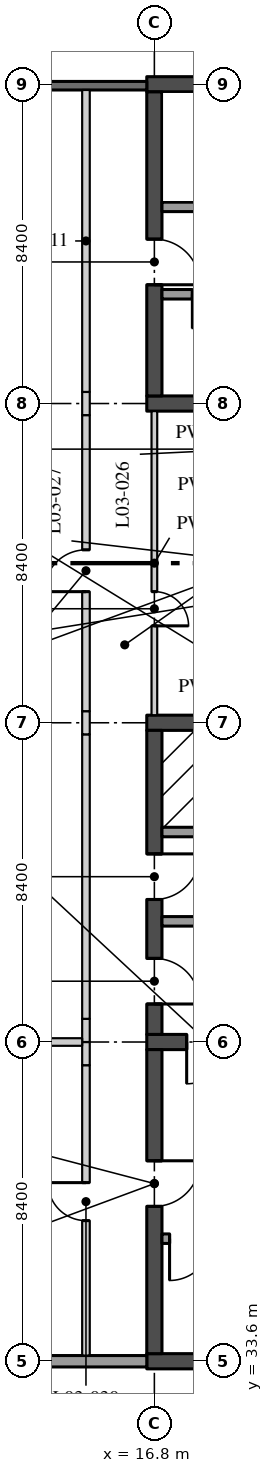
"""IFC4 building model, lengths in metres.
Left out: names, types, materials, properties, quantities, classifications, styles, units other than length and angle.
Written with IfcOpenShell. Run it as: python <this file> out.ifc"""

import sys

from ifc_helpers import new_model, si_unit, direction, frame, frame_2d, origin, place, context, subcontext, project, spatial, rectangle, extrude, element, fill, save


model = new_model("IFC4")
c1 = context("Model", 3, precision=1e-05, world=origin(), true_north=direction((0.0, 1.0)))
c2 = subcontext(c1, "Body", "Model", "MODEL_VIEW")
j1 = project(units=[si_unit("LENGTHUNIT", "METRE"), si_unit("PLANEANGLEUNIT", "RADIAN")], contexts=[c1])
p1 = place(None, origin())
s1 = spatial("IfcSite", under=j1, at=p1, CompositionType="ELEMENT")
p2 = place(p1, origin())
s2 = spatial("IfcBuilding", under=s1, at=p2, CompositionType="ELEMENT")
p3 = place(p2, frame((0.0, 0.0, 14.4)))
s3 = spatial("IfcBuildingStorey", under=s2, at=p3, CompositionType="ELEMENT", Elevation=14.4)
p4 = place(p3, frame((16.6, 42.0, 0.0), z_axis=(0.0, 0.0, 1.0), x_axis=(1.0, 0.0, 0.0)))
e1 = element("IfcWall", 1, at=p4, inside=s3, PredefinedType="SHEAR", context=c2, shape_type="SweptSolid", body=[
    extrude(rectangle(XDim=8.8, YDim=0.4, at=frame_2d((4.4, 0.0))), origin(), (0.0, 0.0, 1.0), 4.37),
])
p5 = place(p4, frame((1.05, 0.0, 0.0)))
e2 = element("IfcOpeningElement", 2, at=p5, cuts=e1, PredefinedType="OPENING", context=c2, shape_type="SweptSolid", body=[
    extrude(rectangle(XDim=1.1, YDim=2.1, at=frame_2d((0.55, 1.05))), frame((0.0, 0.21, 0.0), z_axis=(0.0, -1.0, 0.0), x_axis=(1.0, 0.0, 0.0)), (0.0, 0.0, 1.0), 0.42),
])
p6 = place(p3, frame((16.6, 50.4, 0.0), z_axis=(0.0, 0.0, 1.0), x_axis=(1.0, 0.0, 0.0)))
e3 = element("IfcWall", 3, at=p6, inside=s3, PredefinedType="SHEAR", context=c2, shape_type="SweptSolid", body=[
    extrude(rectangle(XDim=8.8, YDim=0.4, at=frame_2d((4.4, 0.0))), origin(), (0.0, 0.0, 1.0), 4.37),
])
p7 = place(p3, frame((16.8, 42.2, 0.0), z_axis=(0.0, 0.0, 1.0), x_axis=(0.0, 1.0, 0.0)))
e4 = element("IfcWall", 4, at=p7, inside=s3, PredefinedType="SHEAR", context=c2, shape_type="SweptSolid", body=[
    extrude(rectangle(XDim=8.0, YDim=0.4, at=frame_2d((4.0, 0.0))), origin(), (0.0, 0.0, 1.0), 4.37),
])
p8 = place(p7, frame((3.55, 0.0, 0.0)))
e5 = element("IfcOpeningElement", 5, at=p8, cuts=e4, PredefinedType="OPENING", context=c2, shape_type="SweptSolid", body=[
    extrude(rectangle(XDim=1.2, YDim=2.1, at=frame_2d((0.6, 1.05))), frame((0.0, 0.21, 0.0), z_axis=(0.0, -1.0, 0.0), x_axis=(1.0, 0.0, 0.0)), (0.0, 0.0, 1.0), 0.42),
])
p9 = place(p7, frame((0.8, 0.0, 0.0)))
e6 = element("IfcOpeningElement", 6, at=p9, cuts=e4, PredefinedType="OPENING", context=c2, shape_type="SweptSolid", body=[
    extrude(rectangle(XDim=1.2, YDim=2.1, at=frame_2d((0.6, 1.05))), frame((0.0, 0.21, 0.0), z_axis=(0.0, -1.0, 0.0), x_axis=(1.0, 0.0, 0.0)), (0.0, 0.0, 1.0), 0.42),
])
p10 = place(p3, frame((21.7, 47.525, 0.0), z_axis=(0.0, 0.0, 1.0), x_axis=(-1.0, 0.0, 0.0)))
e7 = element("IfcWall", 7, at=p10, inside=s3, PredefinedType="SOLIDWALL", context=c2, shape_type="SweptSolid", body=[
    extrude(rectangle(XDim=4.7, YDim=0.25, at=frame_2d((2.35, 0.0))), origin(), (0.0, 0.0, 1.0), 4.37),
])
p11 = place(p10, frame((1.9, 0.0, 0.0)))
e8 = element("IfcOpeningElement", 8, at=p11, cuts=e7, PredefinedType="OPENING", context=c2, shape_type="SweptSolid", body=[
    extrude(rectangle(XDim=0.9, YDim=2.1, at=frame_2d((0.45, 1.05))), frame((0.0, 0.135, 0.0), z_axis=(0.0, -1.0, 0.0), x_axis=(1.0, 0.0, 0.0)), (0.0, 0.0, 1.0), 0.27),
])
p12 = place(p3, frame((19.65, 45.175, 0.0), z_axis=(0.0, 0.0, 1.0), x_axis=(-1.0, 0.0, 0.0)))
e9 = element("IfcWall", 9, at=p12, inside=s3, PredefinedType="SOLIDWALL", context=c2, shape_type="SweptSolid", body=[
    extrude(rectangle(XDim=2.65, YDim=0.25, at=frame_2d((1.325, 0.0))), origin(), (0.0, 0.0, 1.0), 4.37),
])
for number, where, z_axis, x_axis in (
    (10, (16.6, 58.8, 0.0), (0.0, 0.0, 1.0), (1.0, 0.0, 0.0)),
    (11, (16.6, 67.2, 0.0), (0.0, 0.0, 1.0), (1.0, 0.0, 0.0)),
):
    element("IfcWall", number, at=place(p3, frame(where, z_axis=z_axis, x_axis=x_axis)), inside=s3, PredefinedType="SHEAR", context=c2, shape_type="SweptSolid", body=[
        extrude(rectangle(XDim=8.8, YDim=0.4, at=frame_2d((4.4, 0.0))), origin(), (0.0, 0.0, 1.0), 4.37),
    ])
p13 = place(p3, frame((16.8, 59.0, 0.0), z_axis=(0.0, 0.0, 1.0), x_axis=(0.0, 1.0, 0.0)))
e12 = element("IfcWall", 12, at=p13, inside=s3, PredefinedType="SHEAR", context=c2, shape_type="SweptSolid", body=[
    extrude(rectangle(XDim=8.0, YDim=0.4, at=frame_2d((4.0, 0.0))), origin(), (0.0, 0.0, 1.0), 4.37),
])
p14 = place(p13, frame((2.925, 0.0, 0.0)))
e13 = element("IfcOpeningElement", 13, at=p14, cuts=e12, PredefinedType="OPENING", context=c2, shape_type="SweptSolid", body=[
    extrude(rectangle(XDim=1.2, YDim=2.1, at=frame_2d((0.6, 1.05))), frame((0.0, 0.21, 0.0), z_axis=(0.0, -1.0, 0.0), x_axis=(1.0, 0.0, 0.0)), (0.0, 0.0, 1.0), 0.42),
])
p15 = place(p3, frame((25.0, 63.975, 0.0), z_axis=(0.0, 0.0, 1.0), x_axis=(-1.0, 0.0, 0.0)))
e14 = element("IfcWall", 14, at=p15, inside=s3, PredefinedType="SOLIDWALL", context=c2, shape_type="SweptSolid", body=[
    extrude(rectangle(XDim=8.0, YDim=0.25, at=frame_2d((4.0, 0.0))), origin(), (0.0, 0.0, 1.0), 4.37),
])
p16 = place(p15, frame((0.2, 0.0, 0.0)))
e15 = element("IfcOpeningElement", 15, at=p16, cuts=e14, PredefinedType="OPENING", context=c2, shape_type="SweptSolid", body=[
    extrude(rectangle(XDim=1.1, YDim=2.1, at=frame_2d((0.55, 1.05))), frame((0.0, 0.135, 0.0), z_axis=(0.0, -1.0, 0.0), x_axis=(1.0, 0.0, 0.0)), (0.0, 0.0, 1.0), 0.27),
])
p17 = place(p3, frame((22.35, 61.675, 0.0), z_axis=(0.0, 0.0, 1.0), x_axis=(-1.0, 0.0, 0.0)))
e16 = element("IfcWall", 16, at=p17, inside=s3, PredefinedType="SOLIDWALL", context=c2, shape_type="SweptSolid", body=[
    extrude(rectangle(XDim=5.35, YDim=0.25, at=frame_2d((2.675, 0.0))), origin(), (0.0, 0.0, 1.0), 4.37),
])
p18 = place(p17, frame((3.65, 0.0, 0.0)))
e17 = element("IfcOpeningElement", 17, at=p18, cuts=e16, PredefinedType="OPENING", context=c2, shape_type="SweptSolid", body=[
    extrude(rectangle(XDim=0.9, YDim=2.1, at=frame_2d((0.45, 1.05))), frame((0.0, 0.135, 0.0), z_axis=(0.0, -1.0, 0.0), x_axis=(1.0, 0.0, 0.0)), (0.0, 0.0, 1.0), 0.27),
])
p19 = place(p17, frame((0.9, 0.0, 0.0)))
e18 = element("IfcOpeningElement", 18, at=p19, cuts=e16, PredefinedType="OPENING", context=c2, shape_type="SweptSolid", body=[
    extrude(rectangle(XDim=0.8, YDim=2.1, at=frame_2d((0.4, 1.05))), frame((0.0, 0.135, 0.0), z_axis=(0.0, -1.0, 0.0), x_axis=(1.0, 0.0, 0.0)), (0.0, 0.0, 1.0), 0.27),
])
p20 = place(p3, frame((16.6, 33.6, 0.0), z_axis=(0.0, 0.0, 1.0), x_axis=(1.0, 0.0, 0.0)))
e19 = element("IfcWall", 19, at=p20, inside=s3, PredefinedType="SHEAR", context=c2, shape_type="SweptSolid", body=[
    extrude(rectangle(XDim=8.8, YDim=0.4, at=frame_2d((4.4, 0.0))), origin(), (0.0, 0.0, 1.0), 4.37),
])
p21 = place(p3, frame((16.8, 33.8, 0.0), z_axis=(0.0, 0.0, 1.0), x_axis=(0.0, 1.0, 0.0)))
e20 = element("IfcWall", 20, at=p21, inside=s3, PredefinedType="SHEAR", context=c2, shape_type="SweptSolid", body=[
    extrude(rectangle(XDim=8.0, YDim=0.4, at=frame_2d((4.0, 0.0))), origin(), (0.0, 0.0, 1.0), 4.37),
])
p22 = place(p21, frame((3.875, 0.0, 0.0)))
e21 = element("IfcOpeningElement", 21, at=p22, cuts=e20, PredefinedType="OPENING", context=c2, shape_type="SweptSolid", body=[
    extrude(rectangle(XDim=1.2, YDim=2.1, at=frame_2d((0.6, 1.05))), frame((0.0, 0.21, 0.0), z_axis=(0.0, -1.0, 0.0), x_axis=(1.0, 0.0, 0.0)), (0.0, 0.0, 1.0), 0.42),
])
p23 = place(p3, frame((17.0, 36.825, 0.0), z_axis=(0.0, 0.0, 1.0), x_axis=(1.0, 0.0, 0.0)))
e22 = element("IfcWall", 22, at=p23, inside=s3, PredefinedType="SOLIDWALL", context=c2, shape_type="SweptSolid", body=[
    extrude(rectangle(XDim=8.0, YDim=0.25, at=frame_2d((4.0, 0.0))), origin(), (0.0, 0.0, 1.0), 4.37),
])
p24 = place(p23, frame((0.2, 0.0, 0.0)))
e23 = element("IfcOpeningElement", 23, at=p24, cuts=e22, PredefinedType="OPENING", context=c2, shape_type="SweptSolid", body=[
    extrude(rectangle(XDim=1.1, YDim=2.1, at=frame_2d((0.55, 1.05))), frame((0.0, 0.135, 0.0), z_axis=(0.0, -1.0, 0.0), x_axis=(1.0, 0.0, 0.0)), (0.0, 0.0, 1.0), 0.27),
])
p25 = place(p3, frame((16.8, 50.6, 0.0), z_axis=(0.0, 0.0, 1.0), x_axis=(0.0, 1.0, 0.0)))
e24 = element("IfcWall", 24, at=p25, inside=s3, PredefinedType="PARTITIONING", context=c2, shape_type="SweptSolid", body=[
    extrude(rectangle(XDim=8.0, YDim=0.15, at=frame_2d((4.0, 0.0))), origin(), (0.0, 0.0, 1.0), 3.746),
])
p26 = place(p25, frame((2.35, 0.0, 0.0)))
e25 = element("IfcOpeningElement", 25, at=p26, cuts=e24, PredefinedType="OPENING", context=c2, shape_type="SweptSolid", body=[
    extrude(rectangle(XDim=0.9, YDim=2.1, at=frame_2d((0.45, 1.05))), frame((0.0, 0.085, 0.0), z_axis=(0.0, -1.0, 0.0), x_axis=(1.0, 0.0, 0.0)), (0.0, 0.0, 1.0), 0.17),
])
p27 = place(p3, frame((15.0, 33.75, 0.0), z_axis=(0.0, 0.0, 1.0), x_axis=(0.0, 1.0, 0.0)))
e26 = element("IfcWall", 26, at=p27, inside=s3, PredefinedType="PARTITIONING", context=c2, shape_type="SweptSolid", body=[
    extrude(rectangle(XDim=7.64, YDim=0.2, at=frame_2d((3.82, 0.0))), origin(), (0.0, 0.0, 1.0), 4.37),
])
p28 = place(p27, frame((3.55, 0.0, 0.0)))
e27 = element("IfcOpeningElement", 27, at=p28, cuts=e26, PredefinedType="OPENING", context=c2, shape_type="SweptSolid", body=[
    extrude(rectangle(XDim=1.0, YDim=2.1, at=frame_2d((0.5, 1.05))), frame((0.0, 0.11, 0.0), z_axis=(0.0, -1.0, 0.0), x_axis=(1.0, 0.0, 0.0)), (0.0, 0.0, 1.0), 0.22),
])
for number, where, z_axis, x_axis in (
    (28, (15.0, 41.39, 0.0), (0.0, 0.0, 1.0), (0.0, 1.0, 0.0)),
    (29, (15.0, 42.0, 0.0), (0.0, 0.0, 1.0), (0.0, 1.0, 0.0)),
):
    element("IfcWall", number, at=place(p3, frame(where, z_axis=z_axis, x_axis=x_axis)), inside=s3, PredefinedType="PARTITIONING", context=c2, shape_type="SweptSolid", body=[
        extrude(rectangle(XDim=0.61, YDim=0.2, at=frame_2d((0.305, 0.0))), origin(), (0.0, 0.0, 1.0), 3.746),
    ])
p29 = place(p3, frame((15.0, 42.61, 0.0), z_axis=(0.0, 0.0, 1.0), x_axis=(0.0, 1.0, 0.0)))
e30 = element("IfcWall", 30, at=p29, inside=s3, PredefinedType="PARTITIONING", context=c2, shape_type="SweptSolid", body=[
    extrude(rectangle(XDim=7.485, YDim=0.2, at=frame_2d((3.742, 0.0))), origin(), (0.0, 0.0, 1.0), 4.37),
])
p30 = place(p3, frame((15.0, 50.095, 0.0), z_axis=(0.0, 0.0, 1.0), x_axis=(0.0, 1.0, 0.0)))
e31 = element("IfcWall", 31, at=p30, inside=s3, PredefinedType="PARTITIONING", context=c2, shape_type="SweptSolid", body=[
    extrude(rectangle(XDim=0.61, YDim=0.2, at=frame_2d((0.305, 0.0))), origin(), (0.0, 0.0, 1.0), 3.746),
])
p31 = place(p3, frame((15.0, 50.705, 0.0), z_axis=(0.0, 0.0, 1.0), x_axis=(0.0, 1.0, 0.0)))
e32 = element("IfcWall", 32, at=p31, inside=s3, PredefinedType="PARTITIONING", context=c2, shape_type="SweptSolid", body=[
    extrude(rectangle(XDim=7.79, YDim=0.2, at=frame_2d((3.895, 0.0))), origin(), (0.0, 0.0, 1.0), 4.37),
])
p32 = place(p31, frame((3.145, 0.0, 0.0)))
e33 = element("IfcOpeningElement", 33, at=p32, cuts=e32, PredefinedType="OPENING", context=c2, shape_type="SweptSolid", body=[
    extrude(rectangle(XDim=1.1, YDim=2.1, at=frame_2d((0.55, 1.05))), frame((0.0, 0.11, 0.0), z_axis=(0.0, -1.0, 0.0), x_axis=(1.0, 0.0, 0.0)), (0.0, 0.0, 1.0), 0.22),
])
p33 = place(p3, frame((15.0, 58.495, 0.0), z_axis=(0.0, 0.0, 1.0), x_axis=(0.0, 1.0, 0.0)))
e34 = element("IfcWall", 34, at=p33, inside=s3, PredefinedType="PARTITIONING", context=c2, shape_type="SweptSolid", body=[
    extrude(rectangle(XDim=0.61, YDim=0.2, at=frame_2d((0.305, 0.0))), origin(), (0.0, 0.0, 1.0), 3.746),
])
p34 = place(p3, frame((15.0, 59.105, 0.0), z_axis=(0.0, 0.0, 1.0), x_axis=(0.0, 1.0, 0.0)))
e35 = element("IfcWall", 35, at=p34, inside=s3, PredefinedType="PARTITIONING", context=c2, shape_type="SweptSolid", body=[
    extrude(rectangle(XDim=7.945, YDim=0.2, at=frame_2d((3.973, 0.0))), origin(), (0.0, 0.0, 1.0), 4.37),
])
p35 = place(p3, frame((8.585, 42.0, 0.0), z_axis=(0.0, 0.0, 1.0), x_axis=(1.0, 0.0, 0.0)))
e36 = element("IfcWall", 36, at=p35, inside=s3, PredefinedType="PARTITIONING", context=c2, shape_type="SweptSolid", body=[
    extrude(rectangle(XDim=6.315, YDim=0.2, at=frame_2d((3.157, 0.0))), origin(), (0.0, 0.0, 1.0), 3.746),
])
p36 = place(p3, frame((16.6, 67.163, 0.0), z_axis=(0.0, 0.0, 1.0), x_axis=(-1.0, 0.0, 0.0)))
e37 = element("IfcWall", 37, at=p36, inside=s3, PredefinedType="SOLIDWALL", context=c2, shape_type="SweptSolid", body=[
    extrude(rectangle(XDim=8.195, YDim=0.225, at=frame_2d((4.098, 0.0))), origin(), (0.0, 0.0, 1.0), 3.746),
])
p37 = place(p36, frame((5.2, 0.0, 1.5)))
e38 = element("IfcOpeningElement", 38, at=p37, cuts=e37, PredefinedType="OPENING", context=c2, shape_type="SweptSolid", body=[
    extrude(rectangle(XDim=1.8, YDim=0.6, at=frame_2d((0.9, 0.3))), frame((0.0, 0.123, 0.0), z_axis=(0.0, -1.0, 0.0), x_axis=(1.0, 0.0, 0.0)), (0.0, 0.0, 1.0), 0.245),
])
p38 = place(p3, frame((16.6, 33.6, 0.0), z_axis=(0.0, 0.0, 1.0), x_axis=(-1.0, 0.0, 0.0)))
e39 = element("IfcWall", 39, at=p38, inside=s3, PredefinedType="SOLIDWALL", context=c2, shape_type="SweptSolid", body=[
    extrude(rectangle(XDim=8.195, YDim=0.3, at=frame_2d((4.098, 0.0))), origin(), (0.0, 0.0, 1.0), 3.746),
])
p39 = place(p8, frame((1.2, 0.0, 0.0), z_axis=(0.0, 0.0, 1.0), x_axis=(-1.0, 0.0, 0.0)))
e40 = element("IfcDoor", 40, at=p39, inside=s3, OperationType="SINGLE_SWING_RIGHT", PredefinedType="DOOR", context=c2, shape_type="SweptSolid", body=[
    extrude(rectangle(XDim=1.2, YDim=2.1, at=frame_2d((0.6, 1.05))), frame((0.0, 0.035, 0.0), z_axis=(0.0, -1.0, 0.0), x_axis=(1.0, 0.0, 0.0)), (0.0, 0.0, 1.0), 0.07),
])
fill(e5, e40)
p40 = place(p9, frame((1.2, 0.0, 0.0), z_axis=(0.0, 0.0, 1.0), x_axis=(-1.0, 0.0, 0.0)))
e41 = element("IfcDoor", 41, at=p40, inside=s3, OperationType="SINGLE_SWING_LEFT", PredefinedType="DOOR", context=c2, shape_type="SweptSolid", body=[
    extrude(rectangle(XDim=1.2, YDim=2.1, at=frame_2d((0.6, 1.05))), frame((0.0, 0.035, 0.0), z_axis=(0.0, -1.0, 0.0), x_axis=(1.0, 0.0, 0.0)), (0.0, 0.0, 1.0), 0.07),
])
fill(e6, e41)
p41 = place(p5, frame((1.1, 0.0, 0.0), z_axis=(0.0, 0.0, 1.0), x_axis=(-1.0, 0.0, 0.0)))
e42 = element("IfcDoor", 42, at=p41, inside=s3, OperationType="SINGLE_SWING_LEFT", PredefinedType="DOOR", context=c2, shape_type="SweptSolid", body=[
    extrude(rectangle(XDim=1.1, YDim=2.1, at=frame_2d((0.55, 1.05))), frame((0.0, 0.035, 0.0), z_axis=(0.0, -1.0, 0.0), x_axis=(1.0, 0.0, 0.0)), (0.0, 0.0, 1.0), 0.07),
])
fill(e2, e42)
p42 = place(p14, frame((1.2, 0.0, 0.0), z_axis=(0.0, 0.0, 1.0), x_axis=(-1.0, 0.0, 0.0)))
e43 = element("IfcDoor", 43, at=p42, inside=s3, OperationType="SINGLE_SWING_LEFT", PredefinedType="DOOR", context=c2, shape_type="SweptSolid", body=[
    extrude(rectangle(XDim=1.2, YDim=2.1, at=frame_2d((0.6, 1.05))), frame((0.0, 0.035, 0.0), z_axis=(0.0, -1.0, 0.0), x_axis=(1.0, 0.0, 0.0)), (0.0, 0.0, 1.0), 0.07),
])
fill(e13, e43)
p43 = place(p22, frame((1.2, 0.0, 0.0), z_axis=(0.0, 0.0, 1.0), x_axis=(-1.0, 0.0, 0.0)))
e44 = element("IfcDoor", 44, at=p43, inside=s3, OperationType="SINGLE_SWING_RIGHT", PredefinedType="DOOR", context=c2, shape_type="SweptSolid", body=[
    extrude(rectangle(XDim=1.2, YDim=2.1, at=frame_2d((0.6, 1.05))), frame((0.0, 0.035, 0.0), z_axis=(0.0, -1.0, 0.0), x_axis=(1.0, 0.0, 0.0)), (0.0, 0.0, 1.0), 0.07),
])
fill(e21, e44)
p44 = place(p24, frame((1.1, 0.0, 0.0), z_axis=(0.0, 0.0, 1.0), x_axis=(-1.0, 0.0, 0.0)))
e45 = element("IfcDoor", 45, at=p44, inside=s3, OperationType="SINGLE_SWING_LEFT", PredefinedType="DOOR", context=c2, shape_type="SweptSolid", body=[
    extrude(rectangle(XDim=1.1, YDim=2.1, at=frame_2d((0.55, 1.05))), frame((0.0, 0.035, 0.0), z_axis=(0.0, -1.0, 0.0), x_axis=(1.0, 0.0, 0.0)), (0.0, 0.0, 1.0), 0.07),
])
fill(e23, e45)
p45 = place(p26, frame((0.9, 0.0, 0.0), z_axis=(0.0, 0.0, 1.0), x_axis=(-1.0, 0.0, 0.0)))
e46 = element("IfcDoor", 46, at=p45, inside=s3, OperationType="SINGLE_SWING_LEFT", PredefinedType="DOOR", context=c2, shape_type="SweptSolid", body=[
    extrude(rectangle(XDim=0.9, YDim=2.1, at=frame_2d((0.45, 1.05))), frame((0.0, 0.025, 0.0), z_axis=(0.0, -1.0, 0.0), x_axis=(1.0, 0.0, 0.0)), (0.0, 0.0, 1.0), 0.05),
])
fill(e25, e46)
p46 = place(p28, origin())
e47 = element("IfcDoor", 47, at=p46, inside=s3, OperationType="SINGLE_SWING_LEFT", PredefinedType="DOOR", context=c2, shape_type="SweptSolid", body=[
    extrude(rectangle(XDim=1.0, YDim=2.1, at=frame_2d((0.5, 1.05))), frame((0.0, 0.025, 0.0), z_axis=(0.0, -1.0, 0.0), x_axis=(1.0, 0.0, 0.0)), (0.0, 0.0, 1.0), 0.05),
])
fill(e27, e47)
p47 = place(p32, origin())
e48 = element("IfcDoor", 48, at=p47, inside=s3, OperationType="SINGLE_SWING_RIGHT", PredefinedType="DOOR", context=c2, shape_type="SweptSolid", body=[
    extrude(rectangle(XDim=1.1, YDim=2.1, at=frame_2d((0.55, 1.05))), frame((0.0, 0.025, 0.0), z_axis=(0.0, -1.0, 0.0), x_axis=(1.0, 0.0, 0.0)), (0.0, 0.0, 1.0), 0.05),
])
fill(e33, e48)
save(model, sys.argv[1])
